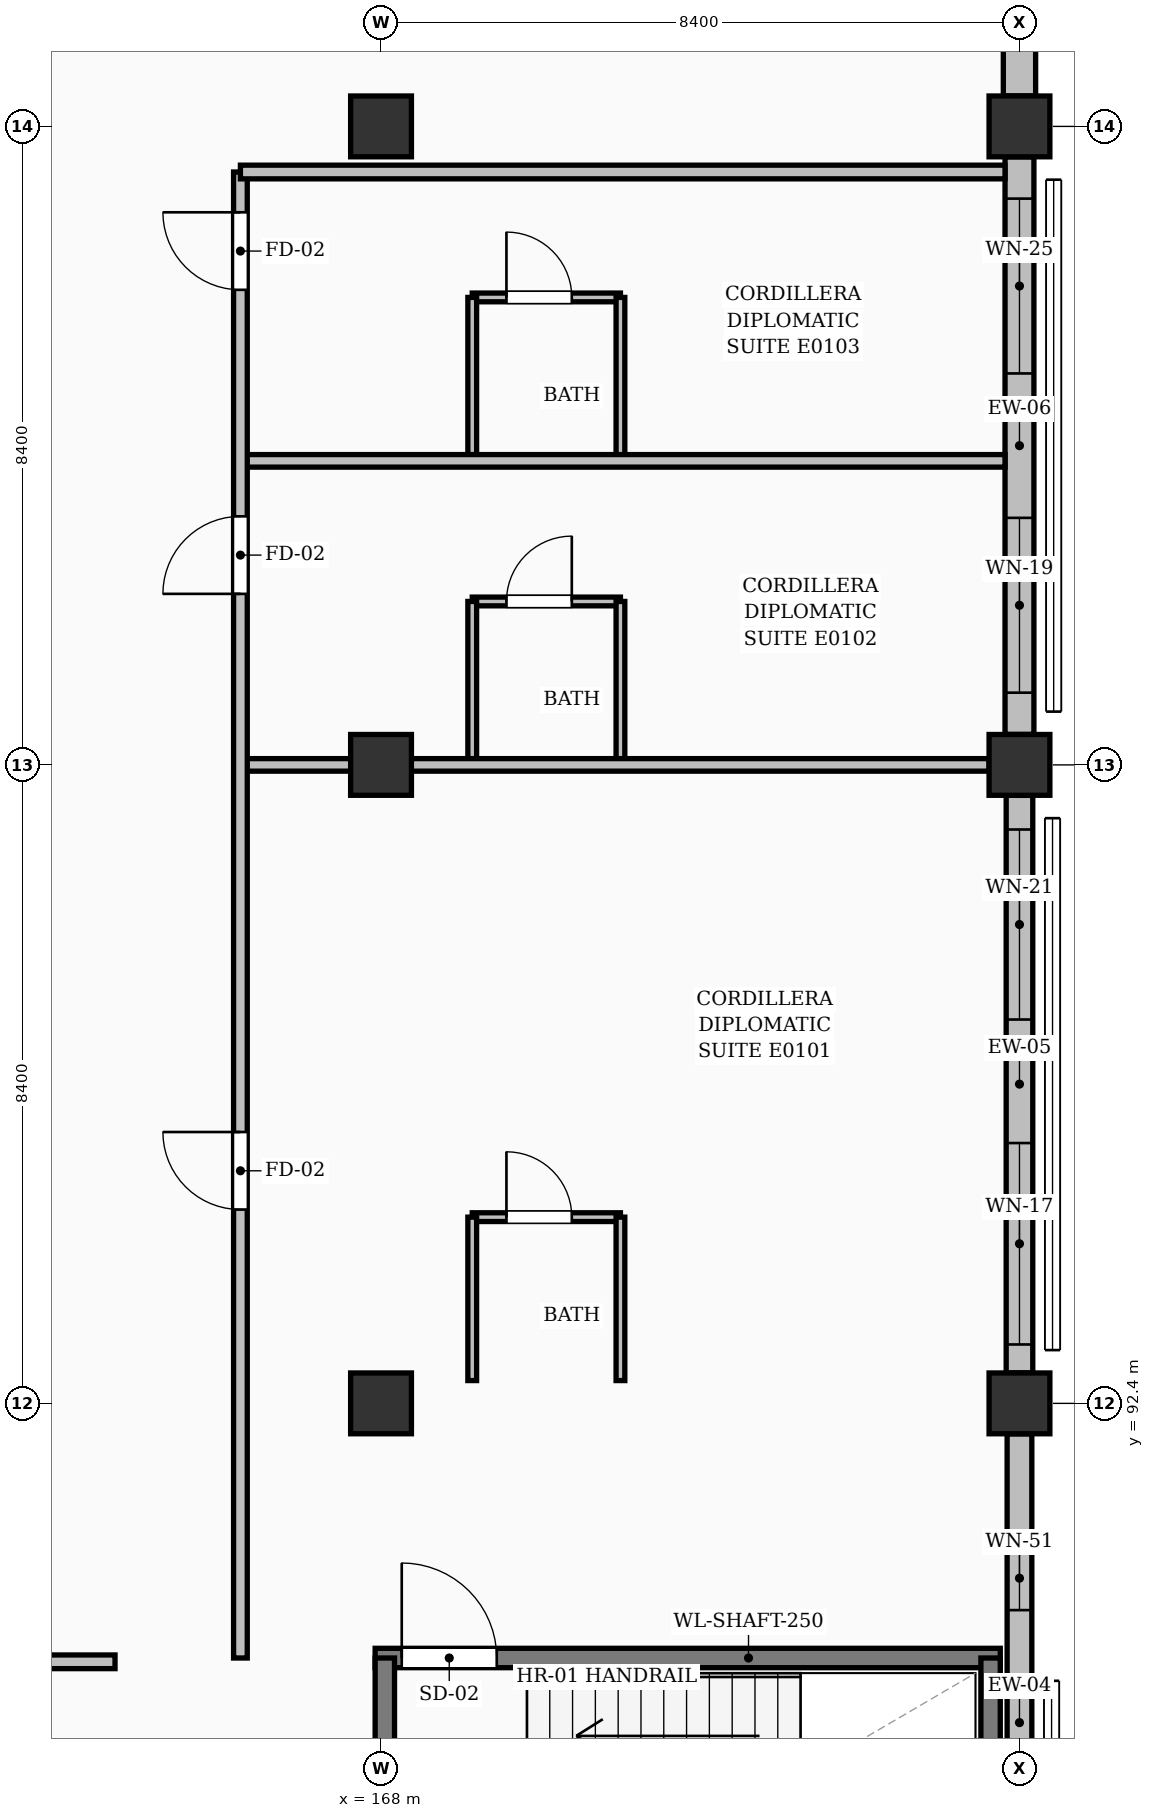
"""IFC4 building model, lengths in metres.
Left out: names, types, materials, properties, quantities, classifications, styles, units other than length and angle.
Written with IfcOpenShell. Run it as: python <this file> out.ifc"""

import sys

from ifc_helpers import new_model, si_unit, direction, frame, frame_2d, origin, origin_2d, place, context, subcontext, project, spatial, rectangle, extrude, element, fill, save


model = new_model("IFC4")
c1 = context("Model", 3, precision=1e-05, world=origin(), true_north=direction((0.0, 1.0)))
c2 = subcontext(c1, "Body", "Model", "MODEL_VIEW")
j1 = project(units=[si_unit("LENGTHUNIT", "METRE"), si_unit("PLANEANGLEUNIT", "RADIAN")], contexts=[c1])
p1 = place(None, origin())
s1 = spatial("IfcSite", under=j1, at=p1, CompositionType="ELEMENT")
p2 = place(p1, origin())
s2 = spatial("IfcBuilding", under=s1, at=p2, CompositionType="ELEMENT")
p3 = place(p2, frame((0.0, 0.0, 3.92)))
s3 = spatial("IfcBuildingStorey", under=s2, at=p3, CompositionType="ELEMENT", Elevation=3.92)
for number, where, z_axis, x_axis in (
    (1, (168.0, 92.4, 0.0), (0.0, 0.0, 1.0), (1.0, 0.0, 0.0)),
    (2, (168.0, 100.8, 0.0), (0.0, 0.0, 1.0), (1.0, 0.0, 0.0)),
    (3, (168.0, 109.2, 0.0), (0.0, 0.0, 1.0), (1.0, 0.0, 0.0)),
    (4, (176.4, 92.4, 0.0), (0.0, 0.0, 1.0), (1.0, 0.0, 0.0)),
    (5, (176.4, 100.8, 0.0), (0.0, 0.0, 1.0), (1.0, 0.0, 0.0)),
    (6, (176.4, 109.2, 0.0), (0.0, 0.0, 1.0), (1.0, 0.0, 0.0)),
):
    element("IfcColumn", number, at=place(p3, frame(where, z_axis=z_axis, x_axis=x_axis)), inside=s3, PredefinedType="COLUMN", context=c2, shape_type="SweptSolid", body=[
        extrude(rectangle(XDim=0.8, YDim=0.8, at=origin_2d()), origin(), (0.0, 0.0, 1.0), 3.64),
    ])
p4 = place(p3, frame((176.4, 84.401, 0.0), z_axis=(0.0, 0.0, 1.0), x_axis=(0.0, 1.0, 0.0)))
e7 = element("IfcWall", 7, at=p4, inside=s3, PredefinedType="SOLIDWALL", context=c2, shape_type="SweptSolid", body=[
    extrude(rectangle(XDim=7.598, YDim=0.325, at=frame_2d((3.799, 0.0))), origin(), (0.0, 0.0, 1.0), 2.734),
])
p5 = place(p4, frame((2.329, 0.0, 0.3)))
e8 = element("IfcOpeningElement", 8, at=p5, cuts=e7, PredefinedType="OPENING", context=c2, shape_type="SweptSolid", body=[
    extrude(rectangle(XDim=0.84, YDim=1.95, at=frame_2d((0.42, 0.975))), frame((0.0, 0.172, 0.0), z_axis=(0.0, -1.0, 0.0), x_axis=(1.0, 0.0, 0.0)), (0.0, 0.0, 1.0), 0.345),
])
p6 = place(p4, frame((5.279, 0.0, 0.3)))
e9 = element("IfcOpeningElement", 9, at=p6, cuts=e7, PredefinedType="OPENING", context=c2, shape_type="SweptSolid", body=[
    extrude(rectangle(XDim=0.84, YDim=1.95, at=frame_2d((0.42, 0.975))), frame((0.0, 0.172, 0.0), z_axis=(0.0, -1.0, 0.0), x_axis=(1.0, 0.0, 0.0)), (0.0, 0.0, 1.0), 0.345),
])
p7 = place(p3, frame((176.4, 92.801, 0.0), z_axis=(0.0, 0.0, 1.0), x_axis=(0.0, 1.0, 0.0)))
e10 = element("IfcWall", 10, at=p7, inside=s3, PredefinedType="SOLIDWALL", context=c2, shape_type="SweptSolid", body=[
    extrude(rectangle(XDim=7.598, YDim=0.35, at=frame_2d((3.799, 0.0))), origin(), (0.0, 0.0, 1.0), 2.734),
])
p8 = place(p7, frame((0.374, 0.0, 0.25)))
e11 = element("IfcOpeningElement", 11, at=p8, cuts=e10, PredefinedType="OPENING", context=c2, shape_type="SweptSolid", body=[
    extrude(rectangle(XDim=2.65, YDim=2.05, at=frame_2d((1.325, 1.025))), frame((0.0, 0.185, 0.0), z_axis=(0.0, -1.0, 0.0), x_axis=(1.0, 0.0, 0.0)), (0.0, 0.0, 1.0), 0.37),
])
p9 = place(p7, frame((4.649, 0.0, 0.25)))
e12 = element("IfcOpeningElement", 12, at=p9, cuts=e10, PredefinedType="OPENING", context=c2, shape_type="SweptSolid", body=[
    extrude(rectangle(XDim=2.5, YDim=2.15, at=frame_2d((1.25, 1.075))), frame((0.0, 0.185, 0.0), z_axis=(0.0, -1.0, 0.0), x_axis=(1.0, 0.0, 0.0)), (0.0, 0.0, 1.0), 0.37),
])
p10 = place(p3, frame((176.4, 101.201, 0.0), z_axis=(0.0, 0.0, 1.0), x_axis=(0.0, 1.0, 0.0)))
e13 = element("IfcWall", 13, at=p10, inside=s3, PredefinedType="SOLIDWALL", context=c2, shape_type="SweptSolid", body=[
    extrude(rectangle(XDim=7.598, YDim=0.38, at=frame_2d((3.799, 0.0))), origin(), (0.0, 0.0, 1.0), 2.734),
])
p11 = place(p10, frame((0.549, 0.0, 0.25)))
e14 = element("IfcOpeningElement", 14, at=p11, cuts=e13, PredefinedType="OPENING", context=c2, shape_type="SweptSolid", body=[
    extrude(rectangle(XDim=2.3, YDim=2.15, at=frame_2d((1.15, 1.075))), frame((0.0, 0.2, 0.0), z_axis=(0.0, -1.0, 0.0), x_axis=(1.0, 0.0, 0.0)), (0.0, 0.0, 1.0), 0.4),
])
p12 = place(p10, frame((4.749, 0.0, 0.25)))
e15 = element("IfcOpeningElement", 15, at=p12, cuts=e13, PredefinedType="OPENING", context=c2, shape_type="SweptSolid", body=[
    extrude(rectangle(XDim=2.3, YDim=1.75, at=frame_2d((1.15, 0.875))), frame((0.0, 0.2, 0.0), z_axis=(0.0, -1.0, 0.0), x_axis=(1.0, 0.0, 0.0)), (0.0, 0.0, 1.0), 0.4),
])
p13 = place(p3, frame((176.4, 109.601, 0.0), z_axis=(0.0, 0.0, 1.0), x_axis=(0.0, 1.0, 0.0)))
e16 = element("IfcWall", 16, at=p13, inside=s3, PredefinedType="SOLIDWALL", context=c2, shape_type="SweptSolid", body=[
    extrude(rectangle(XDim=7.598, YDim=0.425, at=frame_2d((3.799, 0.0))), origin(), (0.0, 0.0, 1.0), 2.734),
])
p14 = place(p13, frame((1.424, 0.0, 0.3)))
e17 = element("IfcOpeningElement", 17, at=p14, cuts=e16, PredefinedType="OPENING", context=c2, shape_type="SweptSolid", body=[
    extrude(rectangle(XDim=0.95, YDim=2.15, at=frame_2d((0.475, 1.075))), frame((0.0, 0.223, 0.0), z_axis=(0.0, -1.0, 0.0), x_axis=(1.0, 0.0, 0.0)), (0.0, 0.0, 1.0), 0.445),
])
p15 = place(p13, frame((4.374, 0.0, 0.3)))
e18 = element("IfcOpeningElement", 18, at=p15, cuts=e16, PredefinedType="OPENING", context=c2, shape_type="SweptSolid", body=[
    extrude(rectangle(XDim=0.95, YDim=2.15, at=frame_2d((0.475, 1.075))), frame((0.0, 0.223, 0.0), z_axis=(0.0, -1.0, 0.0), x_axis=(1.0, 0.0, 0.0)), (0.0, 0.0, 1.0), 0.445),
])
p16 = place(p3, frame((167.923, 89.05, 0.0), z_axis=(0.0, 0.0, 1.0), x_axis=(1.0, 0.0, 0.0)))
e19 = element("IfcWall", 19, at=p16, inside=s3, PredefinedType="SOLIDWALL", context=c2, shape_type="SweptSolid", body=[
    extrude(rectangle(XDim=8.225, YDim=0.255, at=frame_2d((4.112, 0.0))), origin(), (0.0, 0.0, 1.0), 3.36),
])
p17 = place(p16, frame((0.35, 0.0, 0.0)))
e20 = element("IfcOpeningElement", 20, at=p17, cuts=e19, PredefinedType="OPENING", context=c2, shape_type="SweptSolid", body=[
    extrude(rectangle(XDim=1.25, YDim=2.2, at=frame_2d((0.625, 1.1))), frame((0.0, 0.137, 0.0), z_axis=(0.0, -1.0, 0.0), x_axis=(1.0, 0.0, 0.0)), (0.0, 0.0, 1.0), 0.275),
])
for number, where, z_axis, x_axis in (
    (21, (168.05, 85.18, 0.0), (0.0, 0.0, 1.0), (0.0, 1.0, 0.0)),
    (22, (176.02, 85.18, 0.0), (0.0, 0.0, 1.0), (0.0, 1.0, 0.0)),
):
    element("IfcWall", number, at=place(p3, frame(where, z_axis=z_axis, x_axis=x_axis)), inside=s3, PredefinedType="SOLIDWALL", context=c2, shape_type="SweptSolid", body=[
        extrude(rectangle(XDim=3.87, YDim=0.255, at=frame_2d((1.935, 0.0))), origin(), (0.0, 0.0, 1.0), 3.36),
    ])
p18 = place(p3, frame((151.6, 89.0, 0.0), z_axis=(0.0, 0.0, 1.0), x_axis=(1.0, 0.0, 0.0)))
e23 = element("IfcWall", 23, at=p18, inside=s3, PredefinedType="PARTITIONING", context=c2, shape_type="SweptSolid", body=[
    extrude(rectangle(XDim=12.9, YDim=0.18, at=frame_2d((6.45, 0.0))), origin(), (0.0, 0.0, 1.0), 3.36),
])
p19 = place(p18, frame((1.1, 0.0, 0.0)))
e24 = element("IfcOpeningElement", 24, at=p19, cuts=e23, PredefinedType="OPENING", context=c2, shape_type="SweptSolid", body=[
    extrude(rectangle(XDim=1.62, YDim=2.2, at=frame_2d((0.81, 1.1))), frame((0.0, 0.1, 0.0), z_axis=(0.0, -1.0, 0.0), x_axis=(1.0, 0.0, 0.0)), (0.0, 0.0, 1.0), 0.2),
])
p20 = place(p18, frame((5.4, 0.0, 0.0)))
e25 = element("IfcOpeningElement", 25, at=p20, cuts=e23, PredefinedType="OPENING", context=c2, shape_type="SweptSolid", body=[
    extrude(rectangle(XDim=1.62, YDim=2.2, at=frame_2d((0.81, 1.1))), frame((0.0, 0.1, 0.0), z_axis=(0.0, -1.0, 0.0), x_axis=(1.0, 0.0, 0.0)), (0.0, 0.0, 1.0), 0.2),
])
p21 = place(p18, frame((9.7, 0.0, 0.0)))
e26 = element("IfcOpeningElement", 26, at=p21, cuts=e23, PredefinedType="OPENING", context=c2, shape_type="SweptSolid", body=[
    extrude(rectangle(XDim=1.62, YDim=2.2, at=frame_2d((0.81, 1.1))), frame((0.0, 0.1, 0.0), z_axis=(0.0, -1.0, 0.0), x_axis=(1.0, 0.0, 0.0)), (0.0, 0.0, 1.0), 0.2),
])
p22 = place(p3, frame((169.2, 94.85, 0.0), z_axis=(0.0, 0.0, 1.0), x_axis=(1.0, 0.0, 0.0)))
e27 = element("IfcWall", 27, at=p22, inside=s3, PredefinedType="PARTITIONING", context=c2, shape_type="SweptSolid", body=[
    extrude(rectangle(XDim=1.95, YDim=0.115, at=frame_2d((0.975, 0.0))), origin(), (0.0, 0.0, 1.0), 3.36),
])
p23 = place(p22, frame((0.45, 0.0, 0.0)))
e28 = element("IfcOpeningElement", 28, at=p23, cuts=e27, PredefinedType="OPENING", context=c2, shape_type="SweptSolid", body=[
    extrude(rectangle(XDim=0.86, YDim=2.05, at=frame_2d((0.43, 1.025))), frame((0.0, 0.067, 0.0), z_axis=(0.0, -1.0, 0.0), x_axis=(1.0, 0.0, 0.0)), (0.0, 0.0, 1.0), 0.135),
])
for number, where, z_axis, x_axis in (
    (29, (169.2, 92.7, 0.0), (0.0, 0.0, 1.0), (0.0, 1.0, 0.0)),
    (30, (171.15, 92.7, 0.0), (0.0, 0.0, 1.0), (0.0, 1.0, 0.0)),
):
    element("IfcWall", number, at=place(p3, frame(where, z_axis=z_axis, x_axis=x_axis)), inside=s3, PredefinedType="PARTITIONING", context=c2, shape_type="SweptSolid", body=[
        extrude(rectangle(XDim=2.15, YDim=0.115, at=frame_2d((1.075, 0.0))), origin(), (0.0, 0.0, 1.0), 3.36),
    ])
p24 = place(p3, frame((169.2, 102.95, 0.0), z_axis=(0.0, 0.0, 1.0), x_axis=(1.0, 0.0, 0.0)))
e31 = element("IfcWall", 31, at=p24, inside=s3, PredefinedType="PARTITIONING", context=c2, shape_type="SweptSolid", body=[
    extrude(rectangle(XDim=1.95, YDim=0.115, at=frame_2d((0.975, 0.0))), origin(), (0.0, 0.0, 1.0), 3.36),
])
p25 = place(p24, frame((0.45, 0.0, 0.0)))
e32 = element("IfcOpeningElement", 32, at=p25, cuts=e31, PredefinedType="OPENING", context=c2, shape_type="SweptSolid", body=[
    extrude(rectangle(XDim=0.86, YDim=2.05, at=frame_2d((0.43, 1.025))), frame((0.0, 0.067, 0.0), z_axis=(0.0, -1.0, 0.0), x_axis=(1.0, 0.0, 0.0)), (0.0, 0.0, 1.0), 0.135),
])
for number, where, z_axis, x_axis in (
    (33, (169.2, 100.8, 0.0), (0.0, 0.0, 1.0), (0.0, 1.0, 0.0)),
    (34, (171.15, 100.8, 0.0), (0.0, 0.0, 1.0), (0.0, 1.0, 0.0)),
):
    element("IfcWall", number, at=place(p3, frame(where, z_axis=z_axis, x_axis=x_axis)), inside=s3, PredefinedType="PARTITIONING", context=c2, shape_type="SweptSolid", body=[
        extrude(rectangle(XDim=2.15, YDim=0.115, at=frame_2d((1.075, 0.0))), origin(), (0.0, 0.0, 1.0), 3.36),
    ])
p26 = place(p3, frame((166.15, 100.8, 0.0), z_axis=(0.0, 0.0, 1.0), x_axis=(1.0, 0.0, 0.0)))
e35 = element("IfcWall", 35, at=p26, inside=s3, PredefinedType="PARTITIONING", context=c2, shape_type="SweptSolid", body=[
    extrude(rectangle(XDim=9.85, YDim=0.165, at=frame_2d((4.925, 0.0))), origin(), (0.0, 0.0, 1.0), 2.395),
])
p27 = place(p3, frame((169.2, 106.95, 0.0), z_axis=(0.0, 0.0, 1.0), x_axis=(1.0, 0.0, 0.0)))
e36 = element("IfcWall", 36, at=p27, inside=s3, PredefinedType="PARTITIONING", context=c2, shape_type="SweptSolid", body=[
    extrude(rectangle(XDim=1.95, YDim=0.115, at=frame_2d((0.975, 0.0))), origin(), (0.0, 0.0, 1.0), 3.36),
])
p28 = place(p27, frame((0.45, 0.0, 0.0)))
e37 = element("IfcOpeningElement", 37, at=p28, cuts=e36, PredefinedType="OPENING", context=c2, shape_type="SweptSolid", body=[
    extrude(rectangle(XDim=0.86, YDim=2.05, at=frame_2d((0.43, 1.025))), frame((0.0, 0.067, 0.0), z_axis=(0.0, -1.0, 0.0), x_axis=(1.0, 0.0, 0.0)), (0.0, 0.0, 1.0), 0.135),
])
for number, where, z_axis, x_axis in (
    (38, (169.2, 104.8, 0.0), (0.0, 0.0, 1.0), (0.0, 1.0, 0.0)),
    (39, (171.15, 104.8, 0.0), (0.0, 0.0, 1.0), (0.0, 1.0, 0.0)),
):
    element("IfcWall", number, at=place(p3, frame(where, z_axis=z_axis, x_axis=x_axis)), inside=s3, PredefinedType="PARTITIONING", context=c2, shape_type="SweptSolid", body=[
        extrude(rectangle(XDim=2.15, YDim=0.115, at=frame_2d((1.075, 0.0))), origin(), (0.0, 0.0, 1.0), 3.36),
    ])
p29 = place(p3, frame((166.15, 104.8, 0.0), z_axis=(0.0, 0.0, 1.0), x_axis=(1.0, 0.0, 0.0)))
e40 = element("IfcWall", 40, at=p29, inside=s3, PredefinedType="PARTITIONING", context=c2, shape_type="SweptSolid", body=[
    extrude(rectangle(XDim=10.06, YDim=0.165, at=frame_2d((5.03, 0.0))), origin(), (0.0, 0.0, 1.0), 3.36),
])
p30 = place(p3, frame((166.15, 89.05, 0.0), z_axis=(0.0, 0.0, 1.0), x_axis=(0.0, 1.0, 0.0)))
e41 = element("IfcWall", 41, at=p30, inside=s3, PredefinedType="PARTITIONING", context=c2, shape_type="SweptSolid", body=[
    extrude(rectangle(XDim=19.55, YDim=0.18, at=frame_2d((9.775, 0.0))), origin(), (0.0, 0.0, 1.0), 3.36),
])
p31 = place(p30, frame((5.9, 0.0, 0.0)))
e42 = element("IfcOpeningElement", 42, at=p31, cuts=e41, PredefinedType="OPENING", context=c2, shape_type="SweptSolid", body=[
    extrude(rectangle(XDim=1.02, YDim=2.15, at=frame_2d((0.51, 1.075))), frame((0.0, 0.1, 0.0), z_axis=(0.0, -1.0, 0.0), x_axis=(1.0, 0.0, 0.0)), (0.0, 0.0, 1.0), 0.2),
])
p32 = place(p30, frame((14.0, 0.0, 0.0)))
e43 = element("IfcOpeningElement", 43, at=p32, cuts=e41, PredefinedType="OPENING", context=c2, shape_type="SweptSolid", body=[
    extrude(rectangle(XDim=1.02, YDim=2.15, at=frame_2d((0.51, 1.075))), frame((0.0, 0.1, 0.0), z_axis=(0.0, -1.0, 0.0), x_axis=(1.0, 0.0, 0.0)), (0.0, 0.0, 1.0), 0.2),
])
p33 = place(p30, frame((18.0, 0.0, 0.0)))
e44 = element("IfcOpeningElement", 44, at=p33, cuts=e41, PredefinedType="OPENING", context=c2, shape_type="SweptSolid", body=[
    extrude(rectangle(XDim=1.02, YDim=2.15, at=frame_2d((0.51, 1.075))), frame((0.0, 0.1, 0.0), z_axis=(0.0, -1.0, 0.0), x_axis=(1.0, 0.0, 0.0)), (0.0, 0.0, 1.0), 0.2),
])
p34 = place(p3, frame((166.15, 108.6, 0.0), z_axis=(0.0, 0.0, 1.0), x_axis=(1.0, 0.0, 0.0)))
e45 = element("IfcWall", 45, at=p34, inside=s3, PredefinedType="PARTITIONING", context=c2, shape_type="SweptSolid", body=[
    extrude(rectangle(XDim=10.06, YDim=0.18, at=frame_2d((5.03, 0.0))), origin(), (0.0, 0.0, 1.0), 3.36),
])
p35 = place(p6, origin())
e46 = element("IfcWindow", 46, at=p35, inside=s3, PartitioningType="SINGLE_PANEL", PredefinedType="WINDOW", context=c2, shape_type="SweptSolid", body=[
    extrude(rectangle(XDim=0.84, YDim=1.95, at=frame_2d((0.42, 0.975))), frame((0.0, 0.03, 0.0), z_axis=(0.0, -1.0, 0.0), x_axis=(1.0, 0.0, 0.0)), (0.0, 0.0, 1.0), 0.06),
])
fill(e9, e46)
p36 = place(p8, origin())
e47 = element("IfcWindow", 47, at=p36, inside=s3, PartitioningType="DOUBLE_PANEL_VERTICAL", PredefinedType="WINDOW", context=c2, shape_type="SweptSolid", body=[
    extrude(rectangle(XDim=2.65, YDim=2.05, at=frame_2d((1.325, 1.025))), frame((0.0, 0.03, 0.0), z_axis=(0.0, -1.0, 0.0), x_axis=(1.0, 0.0, 0.0)), (0.0, 0.0, 1.0), 0.06),
])
fill(e11, e47)
p37 = place(p9, origin())
e48 = element("IfcWindow", 48, at=p37, inside=s3, PartitioningType="DOUBLE_PANEL_VERTICAL", PredefinedType="WINDOW", context=c2, shape_type="SweptSolid", body=[
    extrude(rectangle(XDim=2.5, YDim=2.15, at=frame_2d((1.25, 1.075))), frame((0.0, 0.03, 0.0), z_axis=(0.0, -1.0, 0.0), x_axis=(1.0, 0.0, 0.0)), (0.0, 0.0, 1.0), 0.06),
])
fill(e12, e48)
p38 = place(p11, origin())
e49 = element("IfcWindow", 49, at=p38, inside=s3, PartitioningType="DOUBLE_PANEL_VERTICAL", PredefinedType="WINDOW", context=c2, shape_type="SweptSolid", body=[
    extrude(rectangle(XDim=2.3, YDim=2.15, at=frame_2d((1.15, 1.075))), frame((0.0, 0.03, 0.0), z_axis=(0.0, -1.0, 0.0), x_axis=(1.0, 0.0, 0.0)), (0.0, 0.0, 1.0), 0.06),
])
fill(e14, e49)
p39 = place(p12, origin())
e50 = element("IfcWindow", 50, at=p39, inside=s3, PartitioningType="DOUBLE_PANEL_VERTICAL", PredefinedType="WINDOW", context=c2, shape_type="SweptSolid", body=[
    extrude(rectangle(XDim=2.3, YDim=1.75, at=frame_2d((1.15, 0.875))), frame((0.0, 0.03, 0.0), z_axis=(0.0, -1.0, 0.0), x_axis=(1.0, 0.0, 0.0)), (0.0, 0.0, 1.0), 0.06),
])
fill(e15, e50)
p40 = place(p17, origin())
e51 = element("IfcDoor", 51, at=p40, inside=s3, OperationType="SINGLE_SWING_LEFT", PredefinedType="DOOR", context=c2, shape_type="SweptSolid", body=[
    extrude(rectangle(XDim=1.25, YDim=2.2, at=frame_2d((0.625, 1.1))), frame((0.0, 0.025, 0.0), z_axis=(0.0, -1.0, 0.0), x_axis=(1.0, 0.0, 0.0)), (0.0, 0.0, 1.0), 0.05),
])
fill(e20, e51)
p41 = place(p23, origin())
e52 = element("IfcDoor", 52, at=p41, inside=s3, OperationType="SINGLE_SWING_LEFT", PredefinedType="DOOR", context=c2, shape_type="SweptSolid", body=[
    extrude(rectangle(XDim=0.86, YDim=2.05, at=frame_2d((0.43, 1.025))), frame((0.0, 0.025, 0.0), z_axis=(0.0, -1.0, 0.0), x_axis=(1.0, 0.0, 0.0)), (0.0, 0.0, 1.0), 0.05),
])
fill(e28, e52)
p42 = place(p25, origin())
e53 = element("IfcDoor", 53, at=p42, inside=s3, OperationType="SINGLE_SWING_RIGHT", PredefinedType="DOOR", context=c2, shape_type="SweptSolid", body=[
    extrude(rectangle(XDim=0.86, YDim=2.05, at=frame_2d((0.43, 1.025))), frame((0.0, 0.025, 0.0), z_axis=(0.0, -1.0, 0.0), x_axis=(1.0, 0.0, 0.0)), (0.0, 0.0, 1.0), 0.05),
])
fill(e32, e53)
p43 = place(p28, origin())
e54 = element("IfcDoor", 54, at=p43, inside=s3, OperationType="SINGLE_SWING_LEFT", PredefinedType="DOOR", context=c2, shape_type="SweptSolid", body=[
    extrude(rectangle(XDim=0.86, YDim=2.05, at=frame_2d((0.43, 1.025))), frame((0.0, 0.025, 0.0), z_axis=(0.0, -1.0, 0.0), x_axis=(1.0, 0.0, 0.0)), (0.0, 0.0, 1.0), 0.05),
])
fill(e37, e54)
p44 = place(p31, origin())
e55 = element("IfcDoor", 55, at=p44, inside=s3, OperationType="SINGLE_SWING_RIGHT", PredefinedType="DOOR", context=c2, shape_type="SweptSolid", body=[
    extrude(rectangle(XDim=1.02, YDim=2.15, at=frame_2d((0.51, 1.075))), frame((0.0, 0.025, 0.0), z_axis=(0.0, -1.0, 0.0), x_axis=(1.0, 0.0, 0.0)), (0.0, 0.0, 1.0), 0.05),
])
fill(e42, e55)
p45 = place(p32, origin())
e56 = element("IfcDoor", 56, at=p45, inside=s3, OperationType="SINGLE_SWING_LEFT", PredefinedType="DOOR", context=c2, shape_type="SweptSolid", body=[
    extrude(rectangle(XDim=1.02, YDim=2.15, at=frame_2d((0.51, 1.075))), frame((0.0, 0.025, 0.0), z_axis=(0.0, -1.0, 0.0), x_axis=(1.0, 0.0, 0.0)), (0.0, 0.0, 1.0), 0.05),
])
fill(e43, e56)
p46 = place(p33, origin())
e57 = element("IfcDoor", 57, at=p46, inside=s3, OperationType="SINGLE_SWING_RIGHT", PredefinedType="DOOR", context=c2, shape_type="SweptSolid", body=[
    extrude(rectangle(XDim=1.02, YDim=2.15, at=frame_2d((0.51, 1.075))), frame((0.0, 0.025, 0.0), z_axis=(0.0, -1.0, 0.0), x_axis=(1.0, 0.0, 0.0)), (0.0, 0.0, 1.0), 0.05),
])
fill(e44, e57)
save(model, sys.argv[1])
